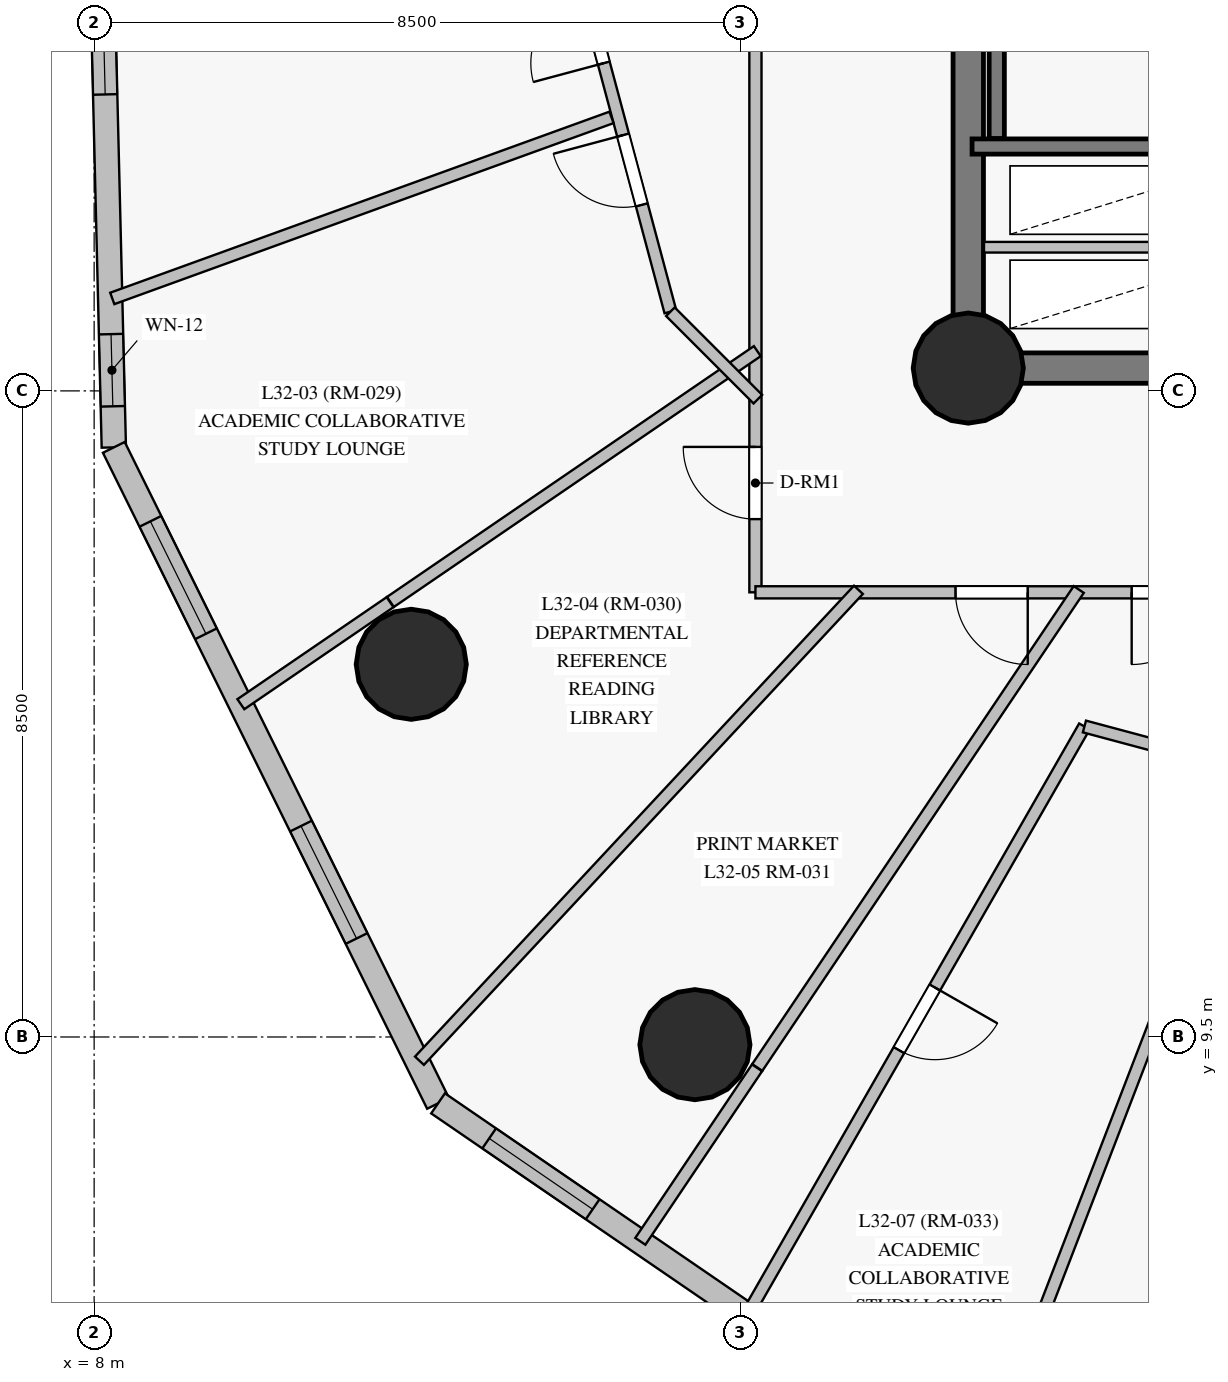
"""IFC4 building model, lengths in metres.
Left out: names, types, materials, properties, quantities, classifications, styles, units other than length and angle.
Written with IfcOpenShell. Run it as: python <this file> out.ifc"""

import sys

from ifc_helpers import new_model, si_unit, direction, frame, frame_2d, origin, origin_with_axes, origin_2d, place, context, subcontext, project, spatial, rectangle, circle, extrude, source, transform, mapped, element, fill, save


model = new_model("IFC4")
c1 = context("Model", 3, precision=1e-05, world=origin(), true_north=direction((0.0, 1.0)))
c2 = subcontext(c1, "Body", "Model", "MODEL_VIEW")
j1 = project(units=[si_unit("LENGTHUNIT", "METRE"), si_unit("PLANEANGLEUNIT", "RADIAN")], contexts=[c1])
p1 = place(None, origin())
s1 = spatial("IfcSite", under=j1, at=p1, CompositionType="ELEMENT")
p2 = place(p1, origin())
s2 = spatial("IfcBuilding", under=s1, at=p2, CompositionType="ELEMENT")
p3 = place(p2, frame((0.0, 0.0, 117.55)))
s3 = spatial("IfcBuildingStorey", under=s2, at=p3, CompositionType="ELEMENT", Elevation=117.55)
p4 = place(p3, frame((19.5, 18.3, 0.0), z_axis=(0.0, 0.0, 1.0), x_axis=(1.0, 0.0, 0.0)))
e1 = element("IfcWall", 1, at=p4, inside=s3, PredefinedType="SHEAR", context=c2, shape_type="SweptSolid", body=[
    extrude(rectangle(XDim=7.05, YDim=0.4, at=frame_2d((3.525, 0.0))), origin(), (0.0, 0.0, 1.0), 2.825),
])
p5 = place(p4, frame((4.2, 0.0, 0.0)))
e2 = element("IfcOpeningElement", 2, at=p5, cuts=e1, PredefinedType="OPENING", context=c2, shape_type="SweptSolid", body=[
    extrude(rectangle(XDim=1.4, YDim=2.2, at=frame_2d((0.7, 1.1))), frame((0.0, 0.21, 0.0), z_axis=(0.0, -1.0, 0.0), x_axis=(1.0, 0.0, 0.0)), (0.0, 0.0, 1.0), 0.42),
])
p6 = place(p3, frame((19.5, 34.7, 0.0), z_axis=(0.0, 0.0, 1.0), x_axis=(0.0, -1.0, 0.0)))
e3 = element("IfcWall", 3, at=p6, inside=s3, PredefinedType="SHEAR", context=c2, shape_type="SweptSolid", body=[
    extrude(rectangle(XDim=16.4, YDim=0.4, at=frame_2d((8.2, 0.0))), origin(), (0.0, 0.0, 1.0), 2.825),
])
p7 = place(p6, frame((3.1, 0.0, 0.0)))
e4 = element("IfcOpeningElement", 4, at=p7, cuts=e3, PredefinedType="OPENING", context=c2, shape_type="SweptSolid", body=[
    extrude(rectangle(XDim=1.1, YDim=2.15, at=frame_2d((0.55, 1.075))), frame((0.0, 0.21, 0.0), z_axis=(0.0, -1.0, 0.0), x_axis=(1.0, 0.0, 0.0)), (0.0, 0.0, 1.0), 0.42),
])
m1 = source(origin_with_axes(), c2, "Body", "SweptSolid", [
    extrude(circle(Radius=0.725, at=origin_2d()), origin(), (0.0, 0.0, 1.0), 3.05),
])
for number, where, z_axis, x_axis in (
    (5, (19.5, 18.3, 0.0), (0.0, 0.0, 1.0), (1.0, 0.0, 0.0)),
    (6, (12.172, 14.403, 0.0), (0.0, 0.0, 1.0), (1.0, 0.0, 0.0)),
    (7, (15.904, 9.399, 0.0), (0.0, 0.0, 1.0), (1.0, 0.0, 0.0)),
):
    element("IfcColumn", number, at=place(p3, frame(where, z_axis=z_axis, x_axis=x_axis)), inside=s3, PredefinedType="COLUMN", context=c2, shape_type="MappedRepresentation", body=[
        mapped(m1, transform((0.0, 0.0, 0.0), scale=1.0)),
    ])
p8 = place(p3, frame((7.917, 31.185, 0.0), z_axis=(0.0, 0.0, 1.0), x_axis=(0.024498324563, -0.999699871008, 0.0)))
e8 = element("IfcWall", 8, at=p8, inside=s3, PredefinedType="SOLIDWALL", context=c2, shape_type="SweptSolid", body=[
    extrude(rectangle(XDim=13.932, YDim=0.32, at=frame_2d((6.966, 0.0))), origin(), (0.0, 0.0, 1.0), 2.825),
])
p9 = place(p8, frame((1.795, 0.0, 0.85)))
e9 = element("IfcOpeningElement", 9, at=p9, cuts=e8, PredefinedType="OPENING", context=c2, shape_type="SweptSolid", body=[
    extrude(rectangle(XDim=1.65, YDim=1.65, at=frame_2d((0.825, 0.825))), frame((0.0, 0.17, 0.0), z_axis=(0.0, -1.0, 0.0), x_axis=(1.0, 0.0, 0.0)), (0.0, 0.0, 1.0), 0.34),
])
p10 = place(p8, frame((7.637, 0.0, 0.85)))
e10 = element("IfcOpeningElement", 10, at=p10, cuts=e8, PredefinedType="OPENING", context=c2, shape_type="SweptSolid", body=[
    extrude(rectangle(XDim=1.65, YDim=1.65, at=frame_2d((0.825, 0.825))), frame((0.0, 0.17, 0.0), z_axis=(0.0, -1.0, 0.0), x_axis=(1.0, 0.0, 0.0)), (0.0, 0.0, 1.0), 0.34),
])
p11 = place(p8, frame((12.442, 0.0, 0.85)))
e11 = element("IfcOpeningElement", 11, at=p11, cuts=e8, PredefinedType="OPENING", context=c2, shape_type="SweptSolid", body=[
    extrude(rectangle(XDim=0.95, YDim=1.5, at=frame_2d((0.475, 0.75))), frame((0.0, 0.17, 0.0), z_axis=(0.0, -1.0, 0.0), x_axis=(1.0, 0.0, 0.0)), (0.0, 0.0, 1.0), 0.34),
])
p12 = place(p3, frame((8.259, 17.257, 0.0), z_axis=(0.0, 0.0, 1.0), x_axis=(0.443120840908, -0.896461890073, 0.0)))
e12 = element("IfcWall", 12, at=p12, inside=s3, PredefinedType="SOLIDWALL", context=c2, shape_type="SweptSolid", body=[
    extrude(rectangle(XDim=9.627, YDim=0.32, at=frame_2d((4.813, 0.0))), origin(), (0.0, 0.0, 1.0), 2.825),
])
p13 = place(p12, frame((1.085, 0.0, 0.85)))
e13 = element("IfcOpeningElement", 13, at=p13, cuts=e12, PredefinedType="OPENING", context=c2, shape_type="SweptSolid", body=[
    extrude(rectangle(XDim=1.65, YDim=1.65, at=frame_2d((0.825, 0.825))), frame((0.0, 0.17, 0.0), z_axis=(0.0, -1.0, 0.0), x_axis=(1.0, 0.0, 0.0)), (0.0, 0.0, 1.0), 0.34),
])
p14 = place(p12, frame((5.557, 0.0, 0.85)))
e14 = element("IfcOpeningElement", 14, at=p14, cuts=e12, PredefinedType="OPENING", context=c2, shape_type="SweptSolid", body=[
    extrude(rectangle(XDim=1.65, YDim=1.65, at=frame_2d((0.825, 0.825))), frame((0.0, 0.17, 0.0), z_axis=(0.0, -1.0, 0.0), x_axis=(1.0, 0.0, 0.0)), (0.0, 0.0, 1.0), 0.34),
])
p15 = place(p3, frame((12.525, 8.627, 0.0), z_axis=(0.0, 0.0, 1.0), x_axis=(0.824983002795, -0.565157540071, 0.0)))
e15 = element("IfcWall", 15, at=p15, inside=s3, PredefinedType="SOLIDWALL", context=c2, shape_type="SweptSolid", body=[
    extrude(rectangle(XDim=11.991, YDim=0.32, at=frame_2d((5.995, 0.0))), origin(), (0.0, 0.0, 1.0), 2.825),
])
p16 = place(p15, frame((0.815, 0.0, 0.85)))
e16 = element("IfcOpeningElement", 16, at=p16, cuts=e15, PredefinedType="OPENING", context=c2, shape_type="SweptSolid", body=[
    extrude(rectangle(XDim=1.65, YDim=1.65, at=frame_2d((0.825, 0.825))), frame((0.0, 0.17, 0.0), z_axis=(0.0, -1.0, 0.0), x_axis=(1.0, 0.0, 0.0)), (0.0, 0.0, 1.0), 0.34),
])
p17 = place(p15, frame((5.956, 0.0, 0.85)))
e17 = element("IfcOpeningElement", 17, at=p17, cuts=e15, PredefinedType="OPENING", context=c2, shape_type="SweptSolid", body=[
    extrude(rectangle(XDim=1.65, YDim=1.65, at=frame_2d((0.825, 0.825))), frame((0.0, 0.17, 0.0), z_axis=(0.0, -1.0, 0.0), x_axis=(1.0, 0.0, 0.0)), (0.0, 0.0, 1.0), 0.34),
])
p18 = place(p15, frame((9.46, 0.0, 0.85)))
e18 = element("IfcOpeningElement", 18, at=p18, cuts=e15, PredefinedType="OPENING", context=c2, shape_type="SweptSolid", body=[
    extrude(rectangle(XDim=1.65, YDim=1.65, at=frame_2d((0.825, 0.825))), frame((0.0, 0.17, 0.0), z_axis=(0.0, -1.0, 0.0), x_axis=(1.0, 0.0, 0.0)), (0.0, 0.0, 1.0), 0.34),
])
p19 = place(p3, frame((19.875, 21.32, 0.0), z_axis=(0.0, 0.0, 1.0), x_axis=(0.0, 1.0, 0.0)))
e19 = element("IfcWall", 19, at=p19, inside=s3, PredefinedType="SHEAR", context=c2, shape_type="SweptSolid", body=[
    extrude(rectangle(XDim=7.5, YDim=0.2, at=frame_2d((3.75, 0.0))), origin(), (0.0, 0.0, 1.0), 2.825),
])
p20 = place(p3, frame((19.55, 21.215, 0.0), z_axis=(0.0, 0.0, 1.0), x_axis=(1.0, 0.0, 0.0)))
e20 = element("IfcWall", 20, at=p20, inside=s3, PredefinedType="SHEAR", context=c2, shape_type="SweptSolid", body=[
    extrude(rectangle(XDim=3.995, YDim=0.2, at=frame_2d((1.998, 0.0))), origin(), (0.0, 0.0, 1.0), 2.825),
])
p21 = place(p3, frame((16.7, 15.35, 0.0), z_axis=(0.0, 0.0, 1.0), x_axis=(0.0, 1.0, 0.0)))
e21 = element("IfcWall", 21, at=p21, inside=s3, PredefinedType="PARTITIONING", context=c2, shape_type="SweptSolid", body=[
    extrude(rectangle(XDim=22.3, YDim=0.16, at=frame_2d((11.15, 0.0))), origin(), (0.0, 0.0, 1.0), 2.225),
])
p22 = place(p21, frame((10.675, 0.0, 0.0)))
e22 = element("IfcOpeningElement", 22, at=p22, cuts=e21, PredefinedType="OPENING", context=c2, shape_type="SweptSolid", body=[
    extrude(rectangle(XDim=0.95, YDim=2.15, at=frame_2d((0.475, 1.075))), frame((0.0, 0.09, 0.0), z_axis=(0.0, -1.0, 0.0), x_axis=(1.0, 0.0, 0.0)), (0.0, 0.0, 1.0), 0.18),
])
p23 = place(p21, frame((0.963, 0.0, 0.0)))
e23 = element("IfcOpeningElement", 23, at=p23, cuts=e21, PredefinedType="OPENING", context=c2, shape_type="SweptSolid", body=[
    extrude(rectangle(XDim=0.95, YDim=2.15, at=frame_2d((0.475, 1.075))), frame((0.0, 0.09, 0.0), z_axis=(0.0, -1.0, 0.0), x_axis=(1.0, 0.0, 0.0)), (0.0, 0.0, 1.0), 0.18),
])
p24 = place(p21, frame((14.02, 0.0, 0.0)))
e24 = element("IfcOpeningElement", 24, at=p24, cuts=e21, PredefinedType="OPENING", context=c2, shape_type="SweptSolid", body=[
    extrude(rectangle(XDim=0.95, YDim=2.15, at=frame_2d((0.475, 1.075))), frame((0.0, 0.09, 0.0), z_axis=(0.0, -1.0, 0.0), x_axis=(1.0, 0.0, 0.0)), (0.0, 0.0, 1.0), 0.18),
])
p25 = place(p3, frame((27.55, 15.35, 0.0), z_axis=(0.0, 0.0, 1.0), x_axis=(-1.0, 0.0, 0.0)))
e25 = element("IfcWall", 25, at=p25, inside=s3, PredefinedType="PARTITIONING", context=c2, shape_type="SweptSolid", body=[
    extrude(rectangle(XDim=10.85, YDim=0.16, at=frame_2d((5.425, 0.0))), origin(), (0.0, 0.0, 1.0), 2.325),
])
p26 = place(p25, frame((7.268, 0.0, 0.0)))
e26 = element("IfcOpeningElement", 26, at=p26, cuts=e25, PredefinedType="OPENING", context=c2, shape_type="SweptSolid", body=[
    extrude(rectangle(XDim=0.95, YDim=2.15, at=frame_2d((0.475, 1.075))), frame((0.0, 0.09, 0.0), z_axis=(0.0, -1.0, 0.0), x_axis=(1.0, 0.0, 0.0)), (0.0, 0.0, 1.0), 0.18),
])
p27 = place(p25, frame((4.95, 0.0, 0.0)))
e27 = element("IfcOpeningElement", 27, at=p27, cuts=e25, PredefinedType="OPENING", context=c2, shape_type="SweptSolid", body=[
    extrude(rectangle(XDim=0.95, YDim=2.15, at=frame_2d((0.475, 1.075))), frame((0.0, 0.09, 0.0), z_axis=(0.0, -1.0, 0.0), x_axis=(1.0, 0.0, 0.0)), (0.0, 0.0, 1.0), 0.18),
])
p28 = place(p3, frame((23.174, 12.844, 0.0), z_axis=(0.0, 0.0, 1.0), x_axis=(-0.359563891754, -0.933120467971, 0.0)))
e28 = element("IfcWall", 28, at=p28, inside=s3, PredefinedType="PARTITIONING", context=c2, shape_type="SweptSolid", body=[
    extrude(rectangle(XDim=9.734, YDim=0.16, at=frame_2d((4.867, 0.0))), origin(), (0.0, 0.0, 1.0), 2.825),
])
p29 = place(p3, frame((21.028, 13.585, 0.0), z_axis=(0.0, 0.0, 1.0), x_axis=(-0.497264087077, -0.867599232194, 0.0)))
e29 = element("IfcWall", 29, at=p29, inside=s3, PredefinedType="PARTITIONING", context=c2, shape_type="SweptSolid", body=[
    extrude(rectangle(XDim=8.9, YDim=0.16, at=frame_2d((4.45, 0.0))), origin(), (0.0, 0.0, 1.0), 2.825),
])
p30 = place(p29, frame((3.958, 0.0, 0.0)))
e30 = element("IfcOpeningElement", 30, at=p30, cuts=e29, PredefinedType="OPENING", context=c2, shape_type="SweptSolid", body=[
    extrude(rectangle(XDim=0.95, YDim=2.15, at=frame_2d((0.475, 1.075))), frame((0.0, 0.09, 0.0), z_axis=(0.0, -1.0, 0.0), x_axis=(1.0, 0.0, 0.0)), (0.0, 0.0, 1.0), 0.18),
])
p31 = place(p3, frame((18.055, 15.383, 0.0), z_axis=(0.0, 0.0, 1.0), x_axis=(-0.6818672514, -0.731475940458, 0.0)))
e31 = element("IfcWall", 31, at=p31, inside=s3, PredefinedType="PARTITIONING", context=c2, shape_type="SweptSolid", body=[
    extrude(rectangle(XDim=8.47, YDim=0.16, at=frame_2d((4.235, 0.0))), origin(), (0.0, 0.0, 1.0), 2.225),
])
p32 = place(p3, frame((15.581, 19.042, 0.0), z_axis=(0.0, 0.0, 1.0), x_axis=(-0.258823534126, 0.965924623448, 0.0)))
e32 = element("IfcWall", 32, at=p32, inside=s3, PredefinedType="PARTITIONING", context=c2, shape_type="SweptSolid", body=[
    extrude(rectangle(XDim=7.722, YDim=0.16, at=frame_2d((3.861, 0.0))), origin(), (0.0, 0.0, 1.0), 2.225),
])
p33 = place(p32, frame((3.386, 0.0, 0.0)))
e33 = element("IfcOpeningElement", 33, at=p33, cuts=e32, PredefinedType="OPENING", context=c2, shape_type="SweptSolid", body=[
    extrude(rectangle(XDim=0.96, YDim=2.15, at=frame_2d((0.48, 1.075))), frame((0.0, 0.09, 0.0), z_axis=(0.0, -1.0, 0.0), x_axis=(1.0, 0.0, 0.0)), (0.0, 0.0, 1.0), 0.18),
])
p34 = place(p32, frame((1.455, 0.0, 0.0)))
e34 = element("IfcOpeningElement", 34, at=p34, cuts=e32, PredefinedType="OPENING", context=c2, shape_type="SweptSolid", body=[
    extrude(rectangle(XDim=0.95, YDim=2.15, at=frame_2d((0.475, 1.075))), frame((0.0, 0.09, 0.0), z_axis=(0.0, -1.0, 0.0), x_axis=(1.0, 0.0, 0.0)), (0.0, 0.0, 1.0), 0.18),
])
p35 = place(p3, frame((20.954, 15.387, 0.0), z_axis=(0.0, 0.0, 1.0), x_axis=(-0.558085558464, -0.829783411159, 0.0)))
e35 = element("IfcWall", 35, at=p35, inside=s3, PredefinedType="PARTITIONING", context=c2, shape_type="SweptSolid", body=[
    extrude(rectangle(XDim=7.579, YDim=0.16, at=frame_2d((3.789, 0.0))), origin(), (0.0, 0.0, 1.0), 2.825),
])
p36 = place(p3, frame((14.806, 21.598, 0.0), z_axis=(0.0, 0.0, 1.0), x_axis=(-0.940102191291, -0.340892754295, 0.0)))
e36 = element("IfcWall", 36, at=p36, inside=s3, PredefinedType="PARTITIONING", context=c2, shape_type="SweptSolid", body=[
    extrude(rectangle(XDim=6.986, YDim=0.16, at=frame_2d((3.493, 0.0))), origin(), (0.0, 0.0, 1.0), 2.825),
])
p37 = place(p3, frame((27.579, 11.83, 0.0), z_axis=(0.0, 0.0, 1.0), x_axis=(-0.96592234089, 0.258832052437, 0.0)))
e37 = element("IfcWall", 37, at=p37, inside=s3, PredefinedType="PARTITIONING", context=c2, shape_type="SweptSolid", body=[
    extrude(rectangle(XDim=6.782, YDim=0.16, at=frame_2d((3.391, 0.0))), origin(), (0.0, 0.0, 1.0), 2.325),
])
p38 = place(p37, frame((2.916, 0.0, 0.0)))
e38 = element("IfcOpeningElement", 38, at=p38, cuts=e37, PredefinedType="OPENING", context=c2, shape_type="SweptSolid", body=[
    extrude(rectangle(XDim=0.95, YDim=2.15, at=frame_2d((0.475, 1.075))), frame((0.0, 0.09, 0.0), z_axis=(0.0, -1.0, 0.0), x_axis=(1.0, 0.0, 0.0)), (0.0, 0.0, 1.0), 0.18),
])
p39 = place(p37, frame((0.98, 0.0, 0.0)))
e39 = element("IfcOpeningElement", 39, at=p39, cuts=e37, PredefinedType="OPENING", context=c2, shape_type="SweptSolid", body=[
    extrude(rectangle(XDim=0.95, YDim=2.15, at=frame_2d((0.475, 1.075))), frame((0.0, 0.09, 0.0), z_axis=(0.0, -1.0, 0.0), x_axis=(1.0, 0.0, 0.0)), (0.0, 0.0, 1.0), 0.18),
])
p40 = place(p3, frame((16.725, 18.523, 0.0), z_axis=(0.0, 0.0, 1.0), x_axis=(-0.825538633176, -0.564345607881, 0.0)))
e40 = element("IfcWall", 40, at=p40, inside=s3, PredefinedType="PARTITIONING", context=c2, shape_type="SweptSolid", body=[
    extrude(rectangle(XDim=5.848, YDim=0.16, at=frame_2d((2.924, 0.0))), origin(), (0.0, 0.0, 1.0), 2.825),
])
p41 = place(p3, frame((19.707, 19.89, 0.0), z_axis=(0.0, 0.0, 1.0), x_axis=(1.0, 0.0, 0.0)))
e41 = element("IfcWall", 41, at=p41, inside=s3, PredefinedType="PARTITIONING", context=c2, shape_type="SweptSolid", body=[
    extrude(rectangle(XDim=3.79, YDim=0.14, at=frame_2d((1.895, 0.0))), origin(), (0.0, 0.0, 1.0), 2.825),
])
p42 = place(p3, frame((16.721, 9.094, 0.0), z_axis=(0.0, 0.0, 1.0), x_axis=(-0.558054489586, -0.829804306239, 0.0)))
e42 = element("IfcWall", 42, at=p42, inside=s3, PredefinedType="PARTITIONING", context=c2, shape_type="SweptSolid", body=[
    extrude(rectangle(XDim=2.751, YDim=0.16, at=frame_2d((1.375, 0.0))), origin(), (0.0, 0.0, 1.0), 2.825),
])
p43 = place(p3, frame((11.893, 15.22, 0.0), z_axis=(0.0, 0.0, 1.0), x_axis=(-0.825486002582, -0.564422589503, 0.0)))
e43 = element("IfcWall", 43, at=p43, inside=s3, PredefinedType="PARTITIONING", context=c2, shape_type="SweptSolid", body=[
    extrude(rectangle(XDim=2.378, YDim=0.16, at=frame_2d((1.189, 0.0))), origin(), (0.0, 0.0, 1.0), 2.825),
])
p44 = place(p3, frame((16.732, 17.891, 0.0), z_axis=(0.0, 0.0, 1.0), x_axis=(-0.707031752615, 0.707181801798, 0.0)))
e44 = element("IfcWall", 44, at=p44, inside=s3, PredefinedType="PARTITIONING", context=c2, shape_type="SweptSolid", body=[
    extrude(rectangle(XDim=1.627, YDim=0.16, at=frame_2d((0.813, 0.0))), origin(), (0.0, 0.0, 1.0), 2.825),
])
m2 = source(origin_with_axes(), c2, "Body", "SweptSolid", [
    extrude(rectangle(XDim=1.65, YDim=1.65, at=frame_2d((0.825, 0.825))), frame((0.0, 0.03, 0.0), z_axis=(0.0, -1.0, 0.0), x_axis=(1.0, 0.0, 0.0)), (0.0, 0.0, 1.0), 0.06),
])
p45 = place(p10, origin())
e45 = element("IfcWindow", 45, at=p45, inside=s3, PartitioningType="SINGLE_PANEL", PredefinedType="WINDOW", context=c2, shape_type="MappedRepresentation", body=[
    mapped(m2, transform((0.0, 0.0, 0.0), scale=1.0)),
])
fill(e10, e45)
m3 = source(origin_with_axes(), c2, "Body", "SweptSolid", [
    extrude(rectangle(XDim=0.95, YDim=1.5, at=frame_2d((0.475, 0.75))), frame((0.0, 0.03, 0.0), z_axis=(0.0, -1.0, 0.0), x_axis=(1.0, 0.0, 0.0)), (0.0, 0.0, 1.0), 0.06),
])
p46 = place(p11, origin())
e46 = element("IfcWindow", 46, at=p46, inside=s3, PartitioningType="SINGLE_PANEL", PredefinedType="WINDOW", context=c2, shape_type="MappedRepresentation", body=[
    mapped(m3, transform((0.0, 0.0, 0.0), scale=1.0)),
])
fill(e11, e46)
p47 = place(p13, origin())
e47 = element("IfcWindow", 47, at=p47, inside=s3, PartitioningType="SINGLE_PANEL", PredefinedType="WINDOW", context=c2, shape_type="MappedRepresentation", body=[
    mapped(m2, transform((0.0, 0.0, 0.0), scale=1.0)),
])
fill(e13, e47)
p48 = place(p14, origin())
e48 = element("IfcWindow", 48, at=p48, inside=s3, PartitioningType="SINGLE_PANEL", PredefinedType="WINDOW", context=c2, shape_type="MappedRepresentation", body=[
    mapped(m2, transform((0.0, 0.0, 0.0), scale=1.0)),
])
fill(e14, e48)
p49 = place(p16, origin())
e49 = element("IfcWindow", 49, at=p49, inside=s3, PartitioningType="SINGLE_PANEL", PredefinedType="WINDOW", context=c2, shape_type="MappedRepresentation", body=[
    mapped(m2, transform((0.0, 0.0, 0.0), scale=1.0)),
])
fill(e16, e49)
m4 = source(origin_with_axes(), c2, "Body", "SweptSolid", [
    extrude(rectangle(XDim=0.95, YDim=2.15, at=frame_2d((0.475, 1.075))), frame((0.0, 0.025, 0.0), z_axis=(0.0, -1.0, 0.0), x_axis=(1.0, 0.0, 0.0)), (0.0, 0.0, 1.0), 0.05),
])
p50 = place(p23, origin())
e50 = element("IfcDoor", 50, at=p50, inside=s3, OperationType="SINGLE_SWING_RIGHT", PredefinedType="DOOR", context=c2, shape_type="MappedRepresentation", body=[
    mapped(m4, transform((0.0, 0.0, 0.0), scale=1.0)),
])
fill(e23, e50)
p51 = place(p26, origin())
e51 = element("IfcDoor", 51, at=p51, inside=s3, OperationType="SINGLE_SWING_LEFT", PredefinedType="DOOR", context=c2, shape_type="MappedRepresentation", body=[
    mapped(m4, transform((0.0, 0.0, 0.0), scale=1.0)),
])
fill(e26, e51)
p52 = place(p27, origin())
e52 = element("IfcDoor", 52, at=p52, inside=s3, OperationType="SINGLE_SWING_RIGHT", PredefinedType="DOOR", context=c2, shape_type="MappedRepresentation", body=[
    mapped(m4, transform((0.0, 0.0, 0.0), scale=1.0)),
])
fill(e27, e52)
m5 = source(origin_with_axes(), c2, "Body", "SweptSolid", [
    extrude(rectangle(XDim=0.96, YDim=2.15, at=frame_2d((0.48, 1.075))), frame((0.0, 0.025, 0.0), z_axis=(0.0, -1.0, 0.0), x_axis=(1.0, 0.0, 0.0)), (0.0, 0.0, 1.0), 0.05),
])
p53 = place(p33, origin())
e53 = element("IfcDoor", 53, at=p53, inside=s3, OperationType="SINGLE_SWING_LEFT", PredefinedType="DOOR", context=c2, shape_type="MappedRepresentation", body=[
    mapped(m5, transform((0.0, 0.0, 0.0), scale=1.0)),
])
fill(e33, e53)
p54 = place(p34, origin())
e54 = element("IfcDoor", 54, at=p54, inside=s3, OperationType="SINGLE_SWING_RIGHT", PredefinedType="DOOR", context=c2, shape_type="MappedRepresentation", body=[
    mapped(m4, transform((0.0, 0.0, 0.0), scale=1.0)),
])
fill(e34, e54)
p55 = place(p30, origin())
e55 = element("IfcDoor", 55, at=p55, inside=s3, OperationType="SINGLE_SWING_LEFT", PredefinedType="DOOR", context=c2, shape_type="MappedRepresentation", body=[
    mapped(m4, transform((0.0, 0.0, 0.0), scale=1.0)),
])
fill(e30, e55)
save(model, sys.argv[1])
